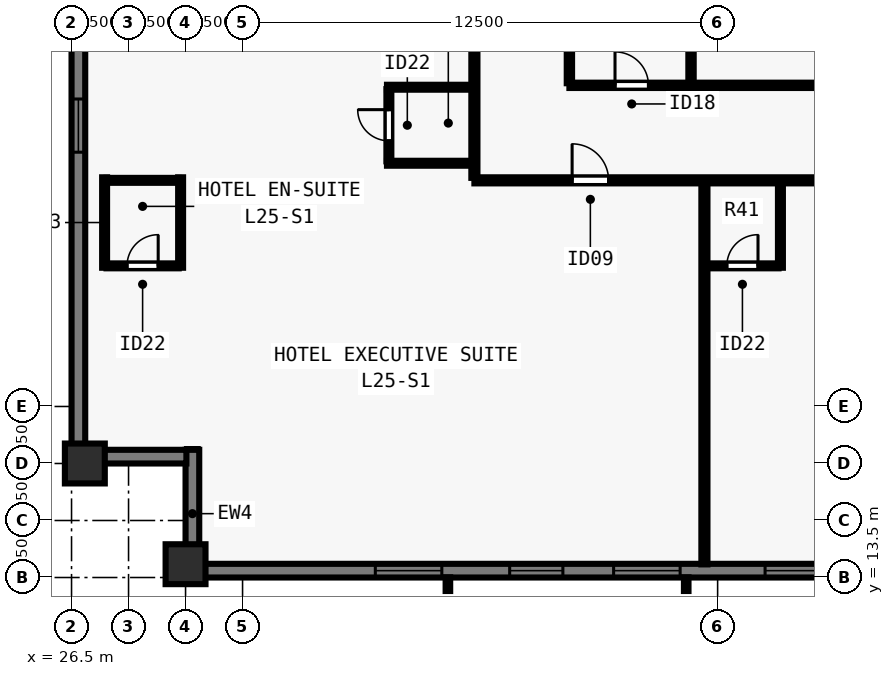
"""IFC4 building model, lengths in metres.
Left out: names, types, materials, properties, quantities, classifications, styles, units other than length and angle.
Written with IfcOpenShell. Run it as: python <this file> out.ifc"""

import sys

from ifc_helpers import new_model, si_unit, direction, frame, frame_2d, origin, origin_2d, place, context, subcontext, project, spatial, rectangle, extrude, element, fill, save


model = new_model("IFC4")
c1 = context("Model", 3, precision=1e-05, world=origin(), true_north=direction((0.0, 1.0)))
c2 = subcontext(c1, "Body", "Model", "MODEL_VIEW")
j1 = project(units=[si_unit("LENGTHUNIT", "METRE"), si_unit("PLANEANGLEUNIT", "RADIAN")], contexts=[c1])
p1 = place(None, origin())
s1 = spatial("IfcSite", under=j1, at=p1, CompositionType="ELEMENT")
p2 = place(p1, origin())
s2 = spatial("IfcBuilding", under=s1, at=p2, CompositionType="ELEMENT")
p3 = place(p2, frame((0.0, 0.0, 93.5)))
s3 = spatial("IfcBuildingStorey", under=s2, at=p3, CompositionType="ELEMENT", Elevation=93.5)
for number, where, z_axis, x_axis in (
    (1, (29.5, 13.85, 0.0), (0.0, 0.0, 1.0), (1.0, 0.0, 0.0)),
    (2, (26.85, 16.5, 0.0), (0.0, 0.0, 1.0), (0.0, 1.0, 0.0)),
):
    element("IfcColumn", number, at=place(p3, frame(where, z_axis=z_axis, x_axis=x_axis)), inside=s3, PredefinedType="COLUMN", context=c2, shape_type="SweptSolid", body=[
        extrude(rectangle(XDim=1.05, YDim=1.05, at=origin_2d()), origin(), (0.0, 0.0, 1.0), 3.5),
    ])
p4 = place(p3, frame((74.5, 13.68, 0.0), z_axis=(0.0, 0.0, 1.0), x_axis=(-1.0, 0.0, 0.0)))
e3 = element("IfcWall", 3, at=p4, inside=s3, PredefinedType="SOLIDWALL", context=c2, shape_type="SweptSolid", body=[
    extrude(rectangle(XDim=44.662, YDim=0.36, at=frame_2d((22.331, 0.0))), origin(), (0.0, 0.0, 1.0), 3.24),
])
p5 = place(p4, frame((4.655, 0.0, 0.8)))
e4 = element("IfcOpeningElement", 4, at=p5, cuts=e3, PredefinedType="OPENING", context=c2, shape_type="SweptSolid", body=[
    extrude(rectangle(XDim=1.75, YDim=1.504, at=frame_2d((0.875, 0.752))), frame((0.0, 0.19, 0.0), z_axis=(0.0, -1.0, 0.0), x_axis=(1.0, 0.0, 0.0)), (0.0, 0.0, 1.0), 0.38),
])
p6 = place(p4, frame((8.19, 0.0, 0.8)))
e5 = element("IfcOpeningElement", 5, at=p6, cuts=e3, PredefinedType="OPENING", context=c2, shape_type="SweptSolid", body=[
    extrude(rectangle(XDim=1.4, YDim=1.504, at=frame_2d((0.7, 0.752))), frame((0.0, 0.19, 0.0), z_axis=(0.0, -1.0, 0.0), x_axis=(1.0, 0.0, 0.0)), (0.0, 0.0, 1.0), 0.38),
])
p7 = place(p4, frame((11.375, 0.0, 0.8)))
e6 = element("IfcOpeningElement", 6, at=p7, cuts=e3, PredefinedType="OPENING", context=c2, shape_type="SweptSolid", body=[
    extrude(rectangle(XDim=1.75, YDim=1.504, at=frame_2d((0.875, 0.752))), frame((0.0, 0.19, 0.0), z_axis=(0.0, -1.0, 0.0), x_axis=(1.0, 0.0, 0.0)), (0.0, 0.0, 1.0), 0.38),
])
p8 = place(p4, frame((14.911, 0.0, 0.8)))
e7 = element("IfcOpeningElement", 7, at=p8, cuts=e3, PredefinedType="OPENING", context=c2, shape_type="SweptSolid", body=[
    extrude(rectangle(XDim=1.4, YDim=1.504, at=frame_2d((0.7, 0.752))), frame((0.0, 0.19, 0.0), z_axis=(0.0, -1.0, 0.0), x_axis=(1.0, 0.0, 0.0)), (0.0, 0.0, 1.0), 0.38),
])
p9 = place(p4, frame((18.546, 0.0, 0.8)))
e8 = element("IfcOpeningElement", 8, at=p9, cuts=e3, PredefinedType="OPENING", context=c2, shape_type="SweptSolid", body=[
    extrude(rectangle(XDim=1.75, YDim=1.504, at=frame_2d((0.875, 0.752))), frame((0.0, 0.19, 0.0), z_axis=(0.0, -1.0, 0.0), x_axis=(1.0, 0.0, 0.0)), (0.0, 0.0, 1.0), 0.38),
])
p10 = place(p4, frame((21.631, 0.0, 0.8)))
e9 = element("IfcOpeningElement", 9, at=p10, cuts=e3, PredefinedType="OPENING", context=c2, shape_type="SweptSolid", body=[
    extrude(rectangle(XDim=1.4, YDim=1.504, at=frame_2d((0.7, 0.752))), frame((0.0, 0.19, 0.0), z_axis=(0.0, -1.0, 0.0), x_axis=(1.0, 0.0, 0.0)), (0.0, 0.0, 1.0), 0.38),
])
p11 = place(p4, frame((24.366, 0.0, 0.8)))
e10 = element("IfcOpeningElement", 10, at=p11, cuts=e3, PredefinedType="OPENING", context=c2, shape_type="SweptSolid", body=[
    extrude(rectangle(XDim=1.75, YDim=1.504, at=frame_2d((0.875, 0.752))), frame((0.0, 0.19, 0.0), z_axis=(0.0, -1.0, 0.0), x_axis=(1.0, 0.0, 0.0)), (0.0, 0.0, 1.0), 0.38),
])
p12 = place(p4, frame((28.351, 0.0, 0.8)))
e11 = element("IfcOpeningElement", 11, at=p12, cuts=e3, PredefinedType="OPENING", context=c2, shape_type="SweptSolid", body=[
    extrude(rectangle(XDim=1.4, YDim=1.504, at=frame_2d((0.7, 0.752))), frame((0.0, 0.19, 0.0), z_axis=(0.0, -1.0, 0.0), x_axis=(1.0, 0.0, 0.0)), (0.0, 0.0, 1.0), 0.38),
])
p13 = place(p4, frame((31.987, 0.0, 0.8)))
e12 = element("IfcOpeningElement", 12, at=p13, cuts=e3, PredefinedType="OPENING", context=c2, shape_type="SweptSolid", body=[
    extrude(rectangle(XDim=1.75, YDim=1.504, at=frame_2d((0.875, 0.752))), frame((0.0, 0.19, 0.0), z_axis=(0.0, -1.0, 0.0), x_axis=(1.0, 0.0, 0.0)), (0.0, 0.0, 1.0), 0.38),
])
p14 = place(p4, frame((35.072, 0.0, 0.8)))
e13 = element("IfcOpeningElement", 13, at=p14, cuts=e3, PredefinedType="OPENING", context=c2, shape_type="SweptSolid", body=[
    extrude(rectangle(XDim=1.4, YDim=1.504, at=frame_2d((0.7, 0.752))), frame((0.0, 0.19, 0.0), z_axis=(0.0, -1.0, 0.0), x_axis=(1.0, 0.0, 0.0)), (0.0, 0.0, 1.0), 0.38),
])
p15 = place(p4, frame((38.257, 0.0, 0.8)))
e14 = element("IfcOpeningElement", 14, at=p15, cuts=e3, PredefinedType="OPENING", context=c2, shape_type="SweptSolid", body=[
    extrude(rectangle(XDim=1.75, YDim=1.504, at=frame_2d((0.875, 0.752))), frame((0.0, 0.19, 0.0), z_axis=(0.0, -1.0, 0.0), x_axis=(1.0, 0.0, 0.0)), (0.0, 0.0, 1.0), 0.38),
])
p16 = place(p3, frame((29.68, 13.5, 0.0), z_axis=(0.0, 0.0, 1.0), x_axis=(0.0, 1.0, 0.0)))
e15 = element("IfcWall", 15, at=p16, inside=s3, PredefinedType="SOLIDWALL", context=c2, shape_type="SweptSolid", body=[
    extrude(rectangle(XDim=3.36, YDim=0.36, at=frame_2d((1.68, 0.0))), origin(), (0.0, 0.0, 1.0), 3.24),
])
p17 = place(p3, frame((29.522, 16.68, 0.0), z_axis=(0.0, 0.0, 1.0), x_axis=(-1.0, 0.0, 0.0)))
e16 = element("IfcWall", 16, at=p17, inside=s3, PredefinedType="SOLIDWALL", context=c2, shape_type="SweptSolid", body=[
    extrude(rectangle(XDim=2.684, YDim=0.36, at=frame_2d((1.342, 0.0))), origin(), (0.0, 0.0, 1.0), 3.24),
])
p18 = place(p3, frame((26.68, 16.5, 0.0), z_axis=(0.0, 0.0, 1.0), x_axis=(0.0, 1.0, 0.0)))
e17 = element("IfcWall", 17, at=p18, inside=s3, PredefinedType="SOLIDWALL", context=c2, shape_type="SweptSolid", body=[
    extrude(rectangle(XDim=44.662, YDim=0.36, at=frame_2d((22.331, 0.0))), origin(), (0.0, 0.0, 1.0), 3.24),
])
p19 = place(p18, frame((8.19, 0.0, 0.8)))
e18 = element("IfcOpeningElement", 18, at=p19, cuts=e17, PredefinedType="OPENING", context=c2, shape_type="SweptSolid", body=[
    extrude(rectangle(XDim=1.4, YDim=1.504, at=frame_2d((0.7, 0.752))), frame((0.0, 0.19, 0.0), z_axis=(0.0, -1.0, 0.0), x_axis=(1.0, 0.0, 0.0)), (0.0, 0.0, 1.0), 0.38),
])
p20 = place(p18, frame((11.375, 0.0, 0.8)))
e19 = element("IfcOpeningElement", 19, at=p20, cuts=e17, PredefinedType="OPENING", context=c2, shape_type="SweptSolid", body=[
    extrude(rectangle(XDim=1.75, YDim=1.504, at=frame_2d((0.875, 0.752))), frame((0.0, 0.19, 0.0), z_axis=(0.0, -1.0, 0.0), x_axis=(1.0, 0.0, 0.0)), (0.0, 0.0, 1.0), 0.38),
])
p21 = place(p18, frame((14.911, 0.0, 0.8)))
e20 = element("IfcOpeningElement", 20, at=p21, cuts=e17, PredefinedType="OPENING", context=c2, shape_type="SweptSolid", body=[
    extrude(rectangle(XDim=1.4, YDim=1.504, at=frame_2d((0.7, 0.752))), frame((0.0, 0.19, 0.0), z_axis=(0.0, -1.0, 0.0), x_axis=(1.0, 0.0, 0.0)), (0.0, 0.0, 1.0), 0.38),
])
p22 = place(p18, frame((18.546, 0.0, 0.8)))
e21 = element("IfcOpeningElement", 21, at=p22, cuts=e17, PredefinedType="OPENING", context=c2, shape_type="SweptSolid", body=[
    extrude(rectangle(XDim=1.75, YDim=1.504, at=frame_2d((0.875, 0.752))), frame((0.0, 0.19, 0.0), z_axis=(0.0, -1.0, 0.0), x_axis=(1.0, 0.0, 0.0)), (0.0, 0.0, 1.0), 0.38),
])
p23 = place(p18, frame((22.881, 0.0, 0.8)))
e22 = element("IfcOpeningElement", 22, at=p23, cuts=e17, PredefinedType="OPENING", context=c2, shape_type="SweptSolid", body=[
    extrude(rectangle(XDim=1.4, YDim=1.504, at=frame_2d((0.7, 0.752))), frame((0.0, 0.19, 0.0), z_axis=(0.0, -1.0, 0.0), x_axis=(1.0, 0.0, 0.0)), (0.0, 0.0, 1.0), 0.38),
])
p24 = place(p18, frame((28.351, 0.0, 0.8)))
e23 = element("IfcOpeningElement", 23, at=p24, cuts=e17, PredefinedType="OPENING", context=c2, shape_type="SweptSolid", body=[
    extrude(rectangle(XDim=1.4, YDim=1.504, at=frame_2d((0.7, 0.752))), frame((0.0, 0.19, 0.0), z_axis=(0.0, -1.0, 0.0), x_axis=(1.0, 0.0, 0.0)), (0.0, 0.0, 1.0), 0.38),
])
p25 = place(p18, frame((31.537, 0.0, 0.8)))
e24 = element("IfcOpeningElement", 24, at=p25, cuts=e17, PredefinedType="OPENING", context=c2, shape_type="SweptSolid", body=[
    extrude(rectangle(XDim=1.75, YDim=1.504, at=frame_2d((0.875, 0.752))), frame((0.0, 0.19, 0.0), z_axis=(0.0, -1.0, 0.0), x_axis=(1.0, 0.0, 0.0)), (0.0, 0.0, 1.0), 0.38),
])
p26 = place(p18, frame((35.072, 0.0, 0.8)))
e25 = element("IfcOpeningElement", 25, at=p26, cuts=e17, PredefinedType="OPENING", context=c2, shape_type="SweptSolid", body=[
    extrude(rectangle(XDim=1.4, YDim=1.504, at=frame_2d((0.7, 0.752))), frame((0.0, 0.19, 0.0), z_axis=(0.0, -1.0, 0.0), x_axis=(1.0, 0.0, 0.0)), (0.0, 0.0, 1.0), 0.38),
])
p27 = place(p3, frame((37.1, 23.95, 0.0), z_axis=(0.0, 0.0, 1.0), x_axis=(1.0, 0.0, 0.0)))
e26 = element("IfcWall", 26, at=p27, inside=s3, PredefinedType="PARTITIONING", context=c2, shape_type="SweptSolid", body=[
    extrude(rectangle(XDim=29.8, YDim=0.16, at=frame_2d((14.9, 0.0))), origin(), (0.0, 0.0, 1.0), 3.24),
])
p28 = place(p27, frame((2.571, 0.0, 0.0)))
e27 = element("IfcOpeningElement", 27, at=p28, cuts=e26, PredefinedType="OPENING", context=c2, shape_type="SweptSolid", body=[
    extrude(rectangle(XDim=0.96, YDim=2.15, at=frame_2d((0.48, 1.075))), frame((0.0, 0.09, 0.0), z_axis=(0.0, -1.0, 0.0), x_axis=(1.0, 0.0, 0.0)), (0.0, 0.0, 1.0), 0.18),
])
p29 = place(p27, frame((15.42, 0.0, 0.0)))
e28 = element("IfcOpeningElement", 28, at=p29, cuts=e26, PredefinedType="OPENING", context=c2, shape_type="SweptSolid", body=[
    extrude(rectangle(XDim=0.96, YDim=2.15, at=frame_2d((0.48, 1.075))), frame((0.0, 0.09, 0.0), z_axis=(0.0, -1.0, 0.0), x_axis=(1.0, 0.0, 0.0)), (0.0, 0.0, 1.0), 0.18),
])
p30 = place(p27, frame((27.269, 0.0, 0.0)))
e29 = element("IfcOpeningElement", 29, at=p30, cuts=e26, PredefinedType="OPENING", context=c2, shape_type="SweptSolid", body=[
    extrude(rectangle(XDim=0.96, YDim=2.15, at=frame_2d((0.48, 1.075))), frame((0.0, 0.09, 0.0), z_axis=(0.0, -1.0, 0.0), x_axis=(1.0, 0.0, 0.0)), (0.0, 0.0, 1.0), 0.18),
])
p31 = place(p3, frame((37.1, 24.015, 0.0), z_axis=(0.0, 0.0, 1.0), x_axis=(0.0, 1.0, 0.0)))
e30 = element("IfcWall", 30, at=p31, inside=s3, PredefinedType="PARTITIONING", context=c2, shape_type="SweptSolid", body=[
    extrude(rectangle(XDim=29.97, YDim=0.16, at=frame_2d((14.985, 0.0))), origin(), (0.0, 0.0, 1.0), 3.24),
])
p32 = place(p31, frame((8.134, 0.0, 0.0)))
e31 = element("IfcOpeningElement", 31, at=p32, cuts=e30, PredefinedType="OPENING", context=c2, shape_type="SweptSolid", body=[
    extrude(rectangle(XDim=0.96, YDim=2.15, at=frame_2d((0.48, 1.075))), frame((0.0, 0.09, 0.0), z_axis=(0.0, -1.0, 0.0), x_axis=(1.0, 0.0, 0.0)), (0.0, 0.0, 1.0), 0.18),
])
p33 = place(p31, frame((22.934, 0.0, 0.0)))
e32 = element("IfcOpeningElement", 32, at=p33, cuts=e30, PredefinedType="OPENING", context=c2, shape_type="SweptSolid", body=[
    extrude(rectangle(XDim=0.96, YDim=2.15, at=frame_2d((0.48, 1.075))), frame((0.0, 0.09, 0.0), z_axis=(0.0, -1.0, 0.0), x_axis=(1.0, 0.0, 0.0)), (0.0, 0.0, 1.0), 0.18),
])
p34 = place(p3, frame((39.6, 26.45, 0.0), z_axis=(0.0, 0.0, 1.0), x_axis=(1.0, 0.0, 0.0)))
e33 = element("IfcWall", 33, at=p34, inside=s3, PredefinedType="PARTITIONING", context=c2, shape_type="SweptSolid", body=[
    extrude(rectangle(XDim=24.8, YDim=0.14, at=frame_2d((12.4, 0.0))), origin(), (0.0, 0.0, 1.0), 3.24),
])
p35 = place(p34, frame((1.2, 0.0, 0.0)))
e34 = element("IfcOpeningElement", 34, at=p35, cuts=e33, PredefinedType="OPENING", context=c2, shape_type="SweptSolid", body=[
    extrude(rectangle(XDim=0.88, YDim=2.1, at=frame_2d((0.44, 1.05))), frame((0.0, 0.08, 0.0), z_axis=(0.0, -1.0, 0.0), x_axis=(1.0, 0.0, 0.0)), (0.0, 0.0, 1.0), 0.16),
])
p36 = place(p34, frame((8.9, 0.0, 0.0)))
e35 = element("IfcOpeningElement", 35, at=p36, cuts=e33, PredefinedType="OPENING", context=c2, shape_type="SweptSolid", body=[
    extrude(rectangle(XDim=0.88, YDim=2.1, at=frame_2d((0.44, 1.05))), frame((0.0, 0.08, 0.0), z_axis=(0.0, -1.0, 0.0), x_axis=(1.0, 0.0, 0.0)), (0.0, 0.0, 1.0), 0.16),
])
p37 = place(p34, frame((19.4, 0.0, 0.0)))
e36 = element("IfcOpeningElement", 36, at=p37, cuts=e33, PredefinedType="OPENING", context=c2, shape_type="SweptSolid", body=[
    extrude(rectangle(XDim=0.88, YDim=2.1, at=frame_2d((0.44, 1.05))), frame((0.0, 0.08, 0.0), z_axis=(0.0, -1.0, 0.0), x_axis=(1.0, 0.0, 0.0)), (0.0, 0.0, 1.0), 0.16),
])
p38 = place(p3, frame((39.6, 26.505, 0.0), z_axis=(0.0, 0.0, 1.0), x_axis=(0.0, 1.0, 0.0)))
e37 = element("IfcWall", 37, at=p38, inside=s3, PredefinedType="PARTITIONING", context=c2, shape_type="SweptSolid", body=[
    extrude(rectangle(XDim=12.245, YDim=0.14, at=frame_2d((6.123, 0.0))), origin(), (0.0, 0.0, 1.0), 3.24),
])
p39 = place(p38, frame((1.045, 0.0, 0.0)))
e38 = element("IfcOpeningElement", 38, at=p39, cuts=e37, PredefinedType="OPENING", context=c2, shape_type="SweptSolid", body=[
    extrude(rectangle(XDim=0.88, YDim=2.1, at=frame_2d((0.44, 1.05))), frame((0.0, 0.08, 0.0), z_axis=(0.0, -1.0, 0.0), x_axis=(1.0, 0.0, 0.0)), (0.0, 0.0, 1.0), 0.16),
])
p40 = place(p38, frame((9.295, 0.0, 0.0)))
e39 = element("IfcOpeningElement", 39, at=p40, cuts=e37, PredefinedType="OPENING", context=c2, shape_type="SweptSolid", body=[
    extrude(rectangle(XDim=0.88, YDim=2.1, at=frame_2d((0.44, 1.05))), frame((0.0, 0.08, 0.0), z_axis=(0.0, -1.0, 0.0), x_axis=(1.0, 0.0, 0.0)), (0.0, 0.0, 1.0), 0.16),
])
p41 = place(p3, frame((42.8, 26.505, 0.0), z_axis=(0.0, 0.0, 1.0), x_axis=(0.0, 1.0, 0.0)))
e40 = element("IfcWall", 40, at=p41, inside=s3, PredefinedType="PARTITIONING", context=c2, shape_type="SweptSolid", body=[
    extrude(rectangle(XDim=3.995, YDim=0.14, at=frame_2d((1.998, 0.0))), origin(), (0.0, 0.0, 1.0), 2.399),
])
for number, where, z_axis, x_axis in (
    (41, (27.37, 21.65, 0.0), (0.0, 0.0, 1.0), (0.0, 1.0, 0.0)),
    (42, (29.37, 21.65, 0.0), (0.0, 0.0, 1.0), (0.0, 1.0, 0.0)),
):
    element("IfcWall", number, at=place(p3, frame(where, z_axis=z_axis, x_axis=x_axis)), inside=s3, PredefinedType="PLUMBINGWALL", context=c2, shape_type="SweptSolid", body=[
        extrude(rectangle(XDim=2.38, YDim=0.13, at=frame_2d((1.19, 0.0))), origin(), (0.0, 0.0, 1.0), 3.24),
    ])
p42 = place(p3, frame((27.42, 21.7, 0.0), z_axis=(0.0, 0.0, 1.0), x_axis=(1.0, 0.0, 0.0)))
e43 = element("IfcWall", 43, at=p42, inside=s3, PredefinedType="PLUMBINGWALL", context=c2, shape_type="SweptSolid", body=[
    extrude(rectangle(XDim=1.9, YDim=0.13, at=frame_2d((0.95, 0.0))), origin(), (0.0, 0.0, 1.0), 3.24),
])
p43 = place(p42, frame((0.54, 0.0, 0.0)))
e44 = element("IfcOpeningElement", 44, at=p43, cuts=e43, PredefinedType="OPENING", context=c2, shape_type="SweptSolid", body=[
    extrude(rectangle(XDim=0.82, YDim=2.1, at=frame_2d((0.41, 1.05))), frame((0.0, 0.075, 0.0), z_axis=(0.0, -1.0, 0.0), x_axis=(1.0, 0.0, 0.0)), (0.0, 0.0, 1.0), 0.15),
])
p44 = place(p3, frame((27.42, 23.95, 0.0), z_axis=(0.0, 0.0, 1.0), x_axis=(1.0, 0.0, 0.0)))
e45 = element("IfcWall", 45, at=p44, inside=s3, PredefinedType="PLUMBINGWALL", context=c2, shape_type="SweptSolid", body=[
    extrude(rectangle(XDim=1.9, YDim=0.13, at=frame_2d((0.95, 0.0))), origin(), (0.0, 0.0, 1.0), 3.24),
])
p45 = place(p3, frame((43.153, 13.845, 0.0), z_axis=(0.0, 0.0, 1.0), x_axis=(0.0, 1.0, 0.0)))
e46 = element("IfcWall", 46, at=p45, inside=s3, PredefinedType="PARTITIONING", context=c2, shape_type="SweptSolid", body=[
    extrude(rectangle(XDim=10.04, YDim=0.16, at=frame_2d((5.02, 0.0))), origin(), (0.0, 0.0, 1.0), 3.24),
])
p46 = place(p3, frame((45.153, 21.65, 0.0), z_axis=(0.0, 0.0, 1.0), x_axis=(0.0, 1.0, 0.0)))
e47 = element("IfcWall", 47, at=p46, inside=s3, PredefinedType="PLUMBINGWALL", context=c2, shape_type="SweptSolid", body=[
    extrude(rectangle(XDim=2.235, YDim=0.13, at=frame_2d((1.118, 0.0))), origin(), (0.0, 0.0, 1.0), 3.24),
])
p47 = place(p3, frame((43.218, 21.7, 0.0), z_axis=(0.0, 0.0, 1.0), x_axis=(1.0, 0.0, 0.0)))
e48 = element("IfcWall", 48, at=p47, inside=s3, PredefinedType="PLUMBINGWALL", context=c2, shape_type="SweptSolid", body=[
    extrude(rectangle(XDim=1.885, YDim=0.13, at=frame_2d((0.942, 0.0))), origin(), (0.0, 0.0, 1.0), 3.24),
])
p48 = place(p47, frame((0.525, 0.0, 0.0)))
e49 = element("IfcOpeningElement", 49, at=p48, cuts=e48, PredefinedType="OPENING", context=c2, shape_type="SweptSolid", body=[
    extrude(rectangle(XDim=0.82, YDim=2.1, at=frame_2d((0.41, 1.05))), frame((0.0, 0.075, 0.0), z_axis=(0.0, -1.0, 0.0), x_axis=(1.0, 0.0, 0.0)), (0.0, 0.0, 1.0), 0.15),
])
p49 = place(p3, frame((34.8, 24.4, 0.0), z_axis=(0.0, 0.0, 1.0), x_axis=(1.0, 0.0, 0.0)))
e50 = element("IfcWall", 50, at=p49, inside=s3, PredefinedType="PLUMBINGWALL", context=c2, shape_type="SweptSolid", body=[
    extrude(rectangle(XDim=2.235, YDim=0.13, at=frame_2d((1.117, 0.0))), origin(), (0.0, 0.0, 1.0), 2.809),
])
p50 = place(p3, frame((34.8, 26.4, 0.0), z_axis=(0.0, 0.0, 1.0), x_axis=(1.0, 0.0, 0.0)))
e51 = element("IfcWall", 51, at=p50, inside=s3, PredefinedType="PLUMBINGWALL", context=c2, shape_type="SweptSolid", body=[
    extrude(rectangle(XDim=2.235, YDim=0.13, at=frame_2d((1.117, 0.0))), origin(), (0.0, 0.0, 1.0), 3.24),
])
p51 = place(p3, frame((34.85, 24.45, 0.0), z_axis=(0.0, 0.0, 1.0), x_axis=(0.0, 1.0, 0.0)))
e52 = element("IfcWall", 52, at=p51, inside=s3, PredefinedType="PLUMBINGWALL", context=c2, shape_type="SweptSolid", body=[
    extrude(rectangle(XDim=1.9, YDim=0.13, at=frame_2d((0.95, 0.0))), origin(), (0.0, 0.0, 1.0), 3.24),
])
p52 = place(p51, frame((0.54, 0.0, 0.0)))
e53 = element("IfcOpeningElement", 53, at=p52, cuts=e52, PredefinedType="OPENING", context=c2, shape_type="SweptSolid", body=[
    extrude(rectangle(XDim=0.82, YDim=2.1, at=frame_2d((0.41, 1.05))), frame((0.0, 0.075, 0.0), z_axis=(0.0, -1.0, 0.0), x_axis=(1.0, 0.0, 0.0)), (0.0, 0.0, 1.0), 0.15),
])
p53 = place(p12, origin())
e54 = element("IfcWindow", 54, at=p53, inside=s3, PartitioningType="SINGLE_PANEL", PredefinedType="WINDOW", context=c2, shape_type="SweptSolid", body=[
    extrude(rectangle(XDim=1.4, YDim=1.504, at=frame_2d((0.7, 0.752))), frame((0.0, -0.05, 0.0), z_axis=(0.0, -1.0, 0.0), x_axis=(1.0, 0.0, 0.0)), (0.0, 0.0, 1.0), 0.06),
])
fill(e11, e54)
p54 = place(p13, origin())
e55 = element("IfcWindow", 55, at=p54, inside=s3, PartitioningType="SINGLE_PANEL", PredefinedType="WINDOW", context=c2, shape_type="SweptSolid", body=[
    extrude(rectangle(XDim=1.75, YDim=1.504, at=frame_2d((0.875, 0.752))), frame((0.0, -0.05, 0.0), z_axis=(0.0, -1.0, 0.0), x_axis=(1.0, 0.0, 0.0)), (0.0, 0.0, 1.0), 0.06),
])
fill(e12, e55)
p55 = place(p14, origin())
e56 = element("IfcWindow", 56, at=p55, inside=s3, PartitioningType="SINGLE_PANEL", PredefinedType="WINDOW", context=c2, shape_type="SweptSolid", body=[
    extrude(rectangle(XDim=1.4, YDim=1.504, at=frame_2d((0.7, 0.752))), frame((0.0, -0.05, 0.0), z_axis=(0.0, -1.0, 0.0), x_axis=(1.0, 0.0, 0.0)), (0.0, 0.0, 1.0), 0.06),
])
fill(e13, e56)
p56 = place(p15, origin())
e57 = element("IfcWindow", 57, at=p56, inside=s3, PartitioningType="SINGLE_PANEL", PredefinedType="WINDOW", context=c2, shape_type="SweptSolid", body=[
    extrude(rectangle(XDim=1.75, YDim=1.504, at=frame_2d((0.875, 0.752))), frame((0.0, -0.05, 0.0), z_axis=(0.0, -1.0, 0.0), x_axis=(1.0, 0.0, 0.0)), (0.0, 0.0, 1.0), 0.06),
])
fill(e14, e57)
p57 = place(p19, origin())
e58 = element("IfcWindow", 58, at=p57, inside=s3, PartitioningType="SINGLE_PANEL", PredefinedType="WINDOW", context=c2, shape_type="SweptSolid", body=[
    extrude(rectangle(XDim=1.4, YDim=1.504, at=frame_2d((0.7, 0.752))), frame((0.0, -0.05, 0.0), z_axis=(0.0, -1.0, 0.0), x_axis=(1.0, 0.0, 0.0)), (0.0, 0.0, 1.0), 0.06),
])
fill(e18, e58)
p58 = place(p35, origin())
e59 = element("IfcDoor", 59, at=p58, inside=s3, OperationType="SINGLE_SWING_LEFT", PredefinedType="DOOR", context=c2, shape_type="SweptSolid", body=[
    extrude(rectangle(XDim=0.88, YDim=2.1, at=frame_2d((0.44, 1.05))), frame((0.0, 0.025, 0.0), z_axis=(0.0, -1.0, 0.0), x_axis=(1.0, 0.0, 0.0)), (0.0, 0.0, 1.0), 0.05),
])
fill(e34, e59)
p59 = place(p43, origin())
e60 = element("IfcDoor", 60, at=p59, inside=s3, OperationType="SINGLE_SWING_RIGHT", PredefinedType="DOOR", context=c2, shape_type="SweptSolid", body=[
    extrude(rectangle(XDim=0.82, YDim=2.1, at=frame_2d((0.41, 1.05))), frame((0.0, 0.025, 0.0), z_axis=(0.0, -1.0, 0.0), x_axis=(1.0, 0.0, 0.0)), (0.0, 0.0, 1.0), 0.05),
])
fill(e44, e60)
p60 = place(p28, origin())
e61 = element("IfcDoor", 61, at=p60, inside=s3, OperationType="SINGLE_SWING_LEFT", PredefinedType="DOOR", context=c2, shape_type="SweptSolid", body=[
    extrude(rectangle(XDim=0.96, YDim=2.15, at=frame_2d((0.48, 1.075))), frame((0.0, 0.025, 0.0), z_axis=(0.0, -1.0, 0.0), x_axis=(1.0, 0.0, 0.0)), (0.0, 0.0, 1.0), 0.05),
])
fill(e27, e61)
p61 = place(p48, origin())
e62 = element("IfcDoor", 62, at=p61, inside=s3, OperationType="SINGLE_SWING_RIGHT", PredefinedType="DOOR", context=c2, shape_type="SweptSolid", body=[
    extrude(rectangle(XDim=0.82, YDim=2.1, at=frame_2d((0.41, 1.05))), frame((0.0, 0.025, 0.0), z_axis=(0.0, -1.0, 0.0), x_axis=(1.0, 0.0, 0.0)), (0.0, 0.0, 1.0), 0.05),
])
fill(e49, e62)
p62 = place(p52, origin())
e63 = element("IfcDoor", 63, at=p62, inside=s3, OperationType="SINGLE_SWING_RIGHT", PredefinedType="DOOR", context=c2, shape_type="SweptSolid", body=[
    extrude(rectangle(XDim=0.82, YDim=2.1, at=frame_2d((0.41, 1.05))), frame((0.0, 0.025, 0.0), z_axis=(0.0, -1.0, 0.0), x_axis=(1.0, 0.0, 0.0)), (0.0, 0.0, 1.0), 0.05),
])
fill(e53, e63)
save(model, sys.argv[1])
